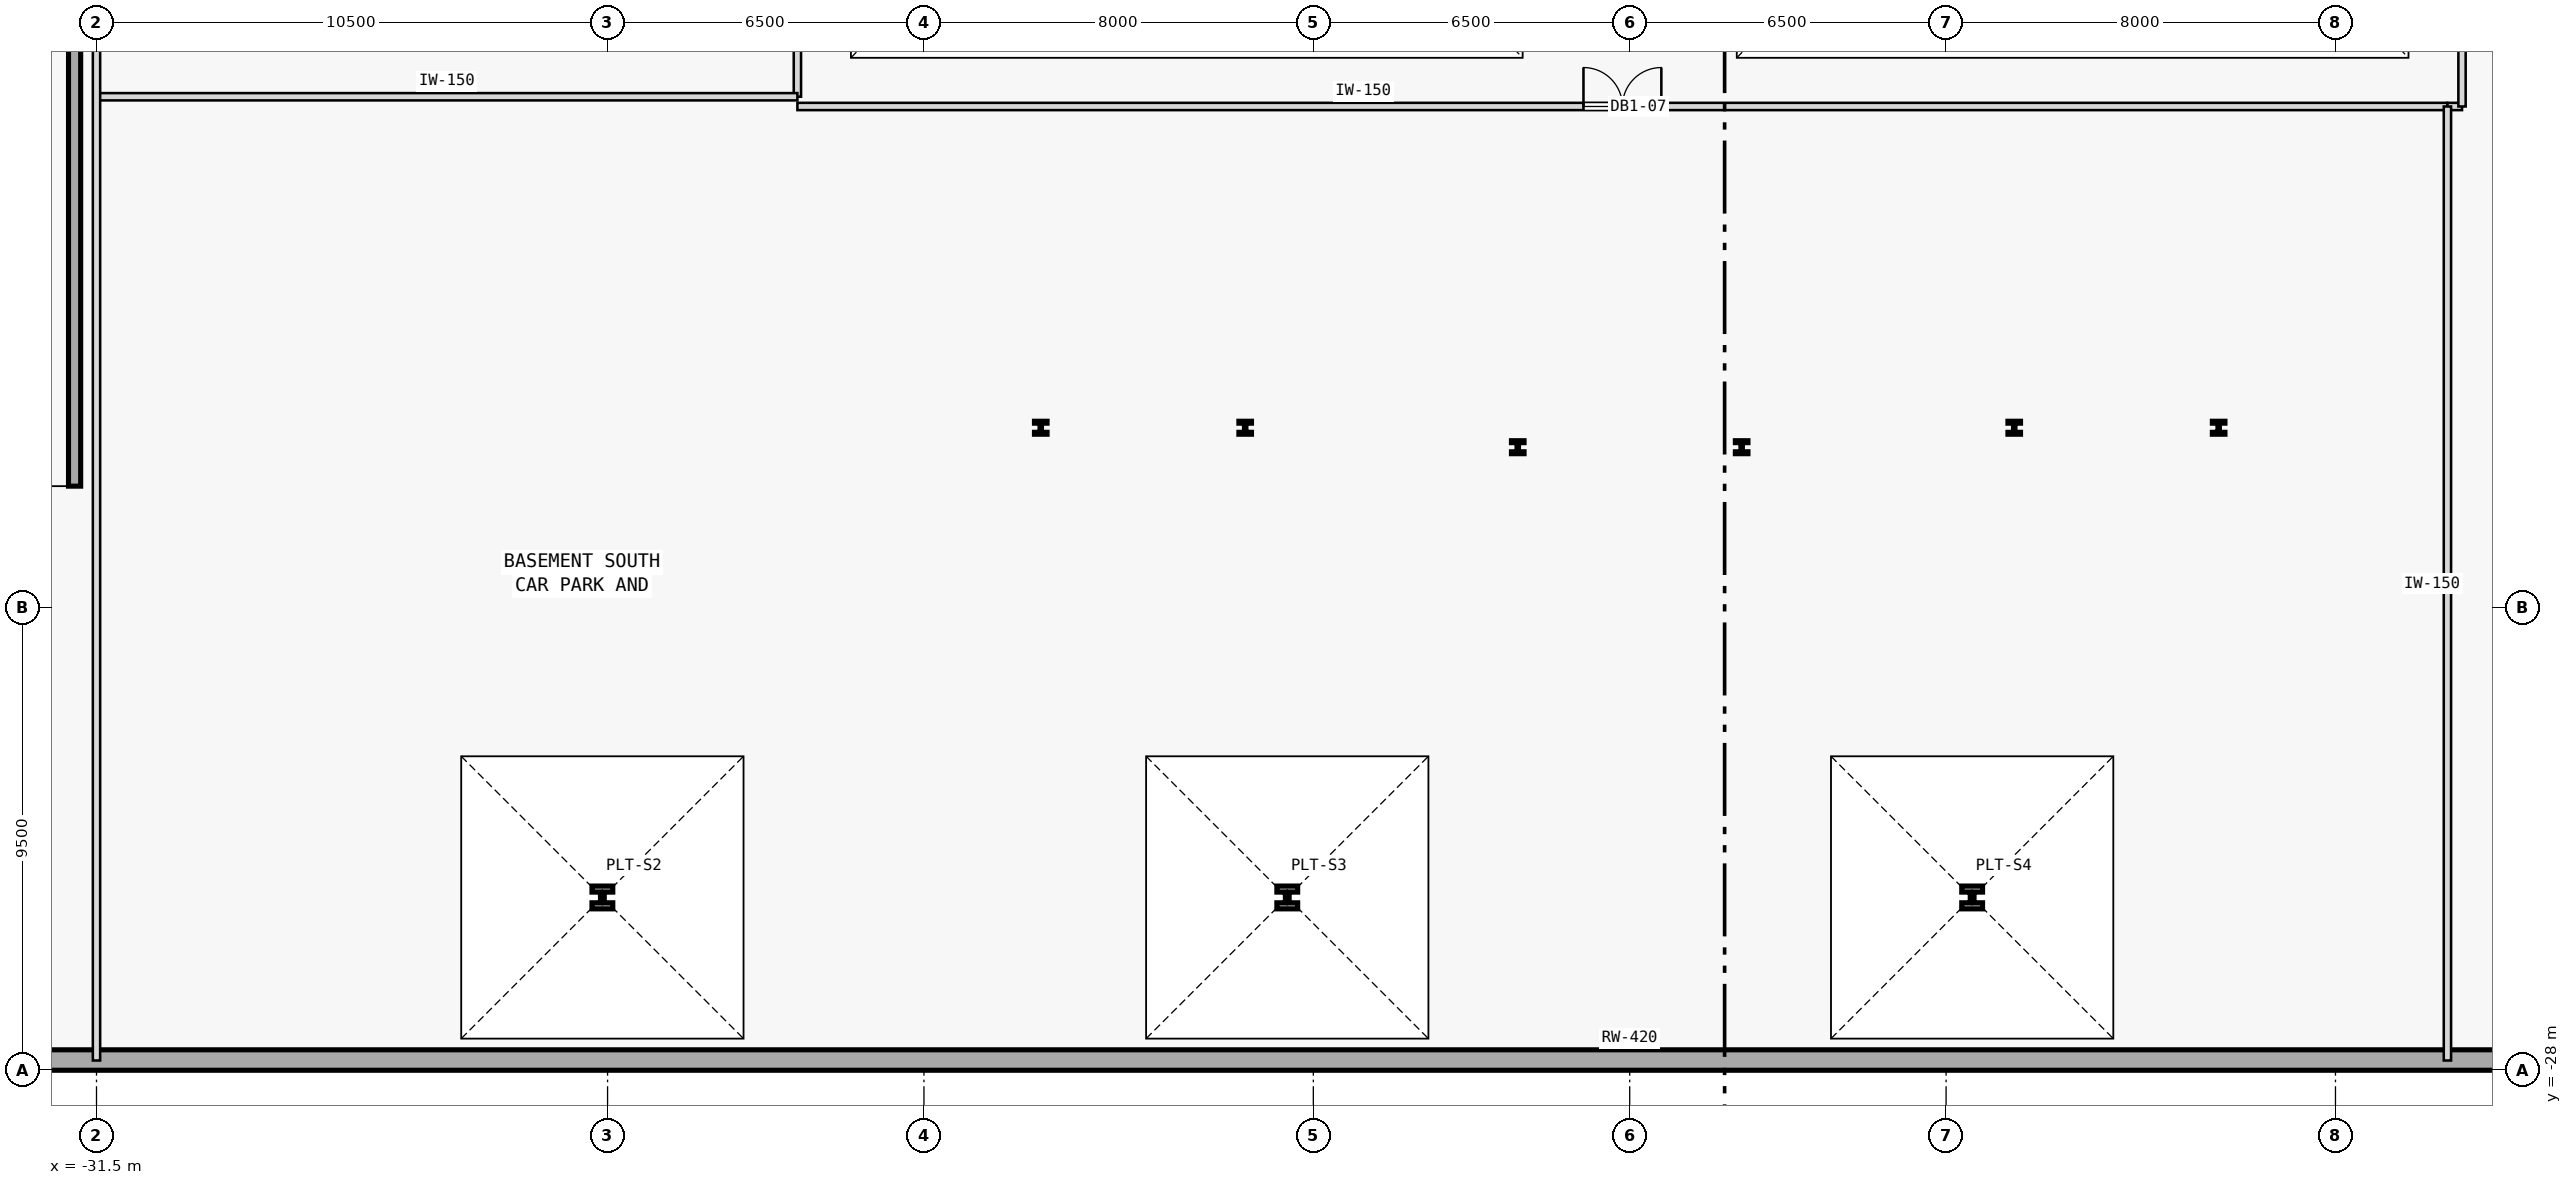
"""IFC4 building model, lengths in metres.
Left out: names, types, materials, properties, quantities, classifications, styles, units other than length and angle.
Written with IfcOpenShell. Run it as: python <this file> out.ifc"""

import sys

from ifc_helpers import new_model, si_unit, direction, frame, frame_2d, origin, origin_2d, place, context, subcontext, project, spatial, rectangle, i_section, extrude, element, fill, save


model = new_model("IFC4")
c1 = context("Model", 3, precision=1e-05, world=origin(), true_north=direction((0.0, 1.0)))
c2 = subcontext(c1, "Body", "Model", "MODEL_VIEW")
j1 = project(units=[si_unit("LENGTHUNIT", "METRE"), si_unit("PLANEANGLEUNIT", "RADIAN")], contexts=[c1])
p1 = place(None, origin())
s1 = spatial("IfcSite", under=j1, at=p1, CompositionType="ELEMENT")
p2 = place(p1, origin())
s2 = spatial("IfcBuilding", under=s1, at=p2, CompositionType="ELEMENT")
p3 = place(p2, frame((0.0, 0.0, -5.0)))
s3 = spatial("IfcBuildingStorey", under=s2, at=p3, CompositionType="ELEMENT", Elevation=-5.0)
p4 = place(p3, frame((-42.0, -27.79, 0.0), z_axis=(0.0, 0.0, 1.0), x_axis=(1.0, 0.0, 0.0)))
e1 = element("IfcWall", 1, at=p4, inside=s3, PredefinedType="SHEAR", context=c2, shape_type="SweptSolid", body=[
    extrude(rectangle(XDim=84.0, YDim=0.42, at=frame_2d((42.0, 0.0))), origin(), (0.0, 0.0, 1.0), 4.7),
])
p5 = place(p3, frame((-31.95, -16.0, 0.0), z_axis=(0.0, 0.0, 1.0), x_axis=(0.0, 1.0, 0.0)))
e2 = element("IfcWall", 2, at=p5, inside=s3, PredefinedType="SHEAR", context=c2, shape_type="SweptSolid", body=[
    extrude(rectangle(XDim=39.8, YDim=0.25, at=frame_2d((19.9, 0.0))), origin(), (0.0, 0.0, 1.0), 4.7),
])
for number, where, z_axis, x_axis in (
    (3, (-21.107, -24.45, 0.0), (0.0, 0.0, 1.0), (1.0, 0.0, 0.0)),
    (4, (-7.036, -24.45, 0.0), (0.0, 0.0, 1.0), (1.0, 0.0, 0.0)),
    (5, (7.036, -24.45, 0.0), (0.0, 0.0, 1.0), (1.0, 0.0, 0.0)),
):
    element("IfcColumn", number, at=place(p3, frame(where, z_axis=z_axis, x_axis=x_axis)), inside=s3, PredefinedType="USERDEFINED", context=c2, shape_type="SweptSolid", body=[
        extrude(i_section(OverallWidth=0.428, OverallDepth=0.469, WebThickness=0.078, FlangeThickness=0.125, FilletRadius=0.015, at=origin_2d()), origin(), (0.0, 0.0, 1.0), 5.0),
    ])
for number, where, z_axis, x_axis in (
    (6, (-12.1, -14.8, 0.0), (0.0, 0.0, 1.0), (1.0, 0.0, 0.0)),
    (7, (-7.9, -14.8, 0.0), (0.0, 0.0, 1.0), (1.0, 0.0, 0.0)),
    (8, (-2.3, -15.2, 0.0), (0.0, 0.0, 1.0), (1.0, 0.0, 0.0)),
    (9, (2.3, -15.2, 0.0), (0.0, 0.0, 1.0), (1.0, 0.0, 0.0)),
    (10, (7.9, -14.8, 0.0), (0.0, 0.0, 1.0), (1.0, 0.0, 0.0)),
    (11, (12.1, -14.8, 0.0), (0.0, 0.0, 1.0), (1.0, 0.0, 0.0)),
):
    element("IfcColumn", number, at=place(p3, frame(where, z_axis=z_axis, x_axis=x_axis)), inside=s3, PredefinedType="COLUMN", context=c2, shape_type="SweptSolid", body=[
        extrude(i_section(OverallWidth=0.259, OverallDepth=0.267, WebThickness=0.013, FlangeThickness=0.021, FilletRadius=0.013, at=origin_2d()), origin(), (0.0, 0.0, 1.0), 5.0),
    ])
p6 = place(p3, frame((-17.1, -8.2, 0.0), z_axis=(0.0, 0.0, 1.0), x_axis=(1.0, 0.0, 0.0)))
e12 = element("IfcWall", 12, at=p6, inside=s3, PredefinedType="PARTITIONING", context=c2, shape_type="SweptSolid", body=[
    extrude(rectangle(XDim=33.9, YDim=0.15, at=frame_2d((16.95, 0.0))), origin(), (0.0, 0.0, 1.0), 4.7),
])
p7 = place(p6, frame((16.15, 0.0, 0.0)))
e13 = element("IfcOpeningElement", 13, at=p7, cuts=e12, PredefinedType="OPENING", context=c2, shape_type="SweptSolid", body=[
    extrude(rectangle(XDim=1.6, YDim=2.15, at=frame_2d((0.8, 1.075))), frame((0.0, 0.085, 0.0), z_axis=(0.0, -1.0, 0.0), x_axis=(1.0, 0.0, 0.0)), (0.0, 0.0, 1.0), 0.17),
])
p8 = place(p3, frame((16.8, -8.2, 0.0), z_axis=(0.0, 0.0, 1.0), x_axis=(1.0, 0.0, 0.0)))
e14 = element("IfcWall", 14, at=p8, inside=s3, PredefinedType="PARTITIONING", context=c2, shape_type="SweptSolid", body=[
    extrude(rectangle(XDim=0.3, YDim=0.15, at=frame_2d((0.15, 0.0))), origin(), (0.0, 0.0, 1.0), 4.7),
])
p9 = place(p3, frame((17.1, -8.2, 0.0), z_axis=(0.0, 0.0, 1.0), x_axis=(0.0, 1.0, 0.0)))
e15 = element("IfcWall", 15, at=p9, inside=s3, PredefinedType="PARTITIONING", context=c2, shape_type="SweptSolid", body=[
    extrude(rectangle(XDim=8.2, YDim=0.15, at=frame_2d((4.1, 0.0))), origin(), (0.0, 0.0, 1.0), 4.7),
])
p10 = place(p9, frame((4.58, 0.0, 0.0)))
e16 = element("IfcOpeningElement", 16, at=p10, cuts=e15, PredefinedType="OPENING", context=c2, shape_type="SweptSolid", body=[
    extrude(rectangle(XDim=1.5, YDim=2.15, at=frame_2d((0.75, 1.075))), frame((0.0, 0.085, 0.0), z_axis=(0.0, -1.0, 0.0), x_axis=(1.0, 0.0, 0.0)), (0.0, 0.0, 1.0), 0.17),
])
p11 = place(p3, frame((-17.1, -8.0, 0.0), z_axis=(0.0, 0.0, 1.0), x_axis=(0.0, 1.0, 0.0)))
e17 = element("IfcWall", 17, at=p11, inside=s3, PredefinedType="PARTITIONING", context=c2, shape_type="SweptSolid", body=[
    extrude(rectangle(XDim=8.0, YDim=0.15, at=frame_2d((4.0, 0.0))), origin(), (0.0, 0.0, 1.0), 4.7),
])
p12 = place(p11, frame((4.4, 0.0, 0.0)))
e18 = element("IfcOpeningElement", 18, at=p12, cuts=e17, PredefinedType="OPENING", context=c2, shape_type="SweptSolid", body=[
    extrude(rectangle(XDim=1.6, YDim=2.15, at=frame_2d((0.8, 1.075))), frame((0.0, 0.085, 0.0), z_axis=(0.0, -1.0, 0.0), x_axis=(1.0, 0.0, 0.0)), (0.0, 0.0, 1.0), 0.17),
])
p13 = place(p3, frame((16.8, -27.8, 0.0), z_axis=(0.0, 0.0, 1.0), x_axis=(0.0, 1.0, 0.0)))
e19 = element("IfcWall", 19, at=p13, inside=s3, PredefinedType="PARTITIONING", context=c2, shape_type="SweptSolid", body=[
    extrude(rectangle(XDim=19.6, YDim=0.15, at=frame_2d((9.8, 0.0))), origin(), (0.0, 0.0, 1.0), 4.7),
])
p14 = place(p3, frame((-31.5, -8.0, 0.0), z_axis=(0.0, 0.0, 1.0), x_axis=(1.0, 0.0, 0.0)))
e20 = element("IfcWall", 20, at=p14, inside=s3, PredefinedType="PARTITIONING", context=c2, shape_type="SweptSolid", body=[
    extrude(rectangle(XDim=14.4, YDim=0.15, at=frame_2d((7.2, 0.0))), origin(), (0.0, 0.0, 1.0), 4.7),
])
p15 = place(p3, frame((-31.5, -27.8, 0.0), z_axis=(0.0, 0.0, 1.0), x_axis=(0.0, 1.0, 0.0)))
e21 = element("IfcWall", 21, at=p15, inside=s3, PredefinedType="PARTITIONING", context=c2, shape_type="SweptSolid", body=[
    extrude(rectangle(XDim=55.6, YDim=0.15, at=frame_2d((27.8, 0.0))), origin(), (0.0, 0.0, 1.0), 4.7),
])
p16 = place(p7, origin())
e22 = element("IfcDoor", 22, at=p16, inside=s3, OperationType="DOUBLE_DOOR_SINGLE_SWING", PredefinedType="DOOR", context=c2, shape_type="SweptSolid", body=[
    extrude(rectangle(XDim=1.6, YDim=2.15, at=frame_2d((0.8, 1.075))), frame((0.0, 0.025, 0.0), z_axis=(0.0, -1.0, 0.0), x_axis=(1.0, 0.0, 0.0)), (0.0, 0.0, 1.0), 0.05),
])
fill(e13, e22)
save(model, sys.argv[1])
